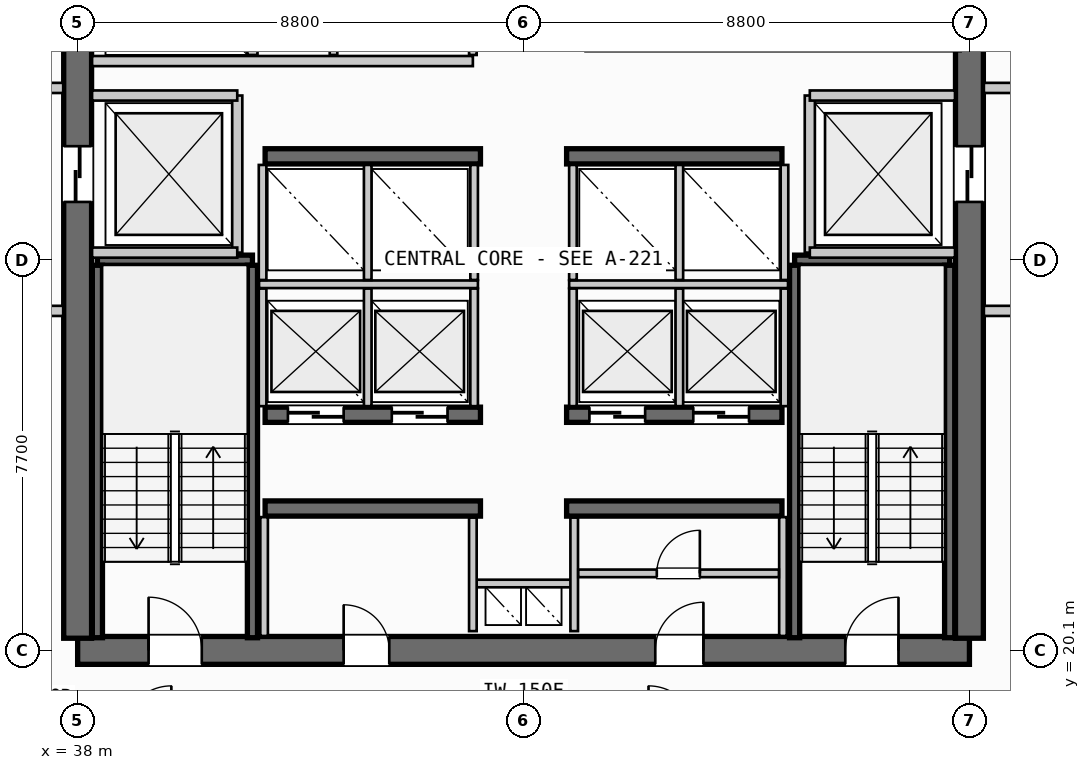
"""IFC4 building model, lengths in metres.
Left out: names, types, materials, properties, quantities, classifications, styles, units other than length and angle.
Written with IfcOpenShell. Run it as: python <this file> out.ifc"""

import sys

from ifc_helpers import new_model, si_unit, direction, frame, frame_2d, origin, place, context, subcontext, project, spatial, rectangle, extrude, source, transform, mapped, element, fill, save


model = new_model("IFC4")
c1 = context("Model", 3, precision=1e-05, world=origin(), true_north=direction((0.0, 1.0)))
c2 = subcontext(c1, "Body", "Model", "MODEL_VIEW")
j1 = project(units=[si_unit("LENGTHUNIT", "METRE"), si_unit("PLANEANGLEUNIT", "RADIAN")], contexts=[c1])
p1 = place(None, origin())
s1 = spatial("IfcSite", under=j1, at=p1, CompositionType="ELEMENT")
p2 = place(p1, origin())
s2 = spatial("IfcBuilding", under=s1, at=p2, CompositionType="ELEMENT")
p3 = place(p2, frame((0.0, 0.0, 153.65)))
s3 = spatial("IfcBuildingStorey", under=s2, at=p3, CompositionType="ELEMENT", Elevation=153.65)
p4 = place(p3, frame((38.0, 20.1, 0.0), z_axis=(0.0, 0.0, 1.0), x_axis=(1.0, 0.0, 0.0)))
e1 = element("IfcWall", 1, at=p4, inside=s3, PredefinedType="SHEAR", context=c2, shape_type="SweptSolid", body=[
    extrude(rectangle(XDim=17.6, YDim=0.55, at=frame_2d((8.8, 0.0))), origin(), (0.0, 0.0, 1.0), 3.3),
])
p5 = place(p4, frame((1.4, 0.0, 0.0)))
e2 = element("IfcOpeningElement", 2, at=p5, cuts=e1, PredefinedType="OPENING", context=c2, shape_type="SweptSolid", body=[
    extrude(rectangle(XDim=1.05, YDim=2.15, at=frame_2d((0.525, 1.075))), frame((0.0, 0.285, 0.0), z_axis=(0.0, -1.0, 0.0), x_axis=(1.0, 0.0, 0.0)), (0.0, 0.0, 1.0), 0.57),
])
p6 = place(p4, frame((15.15, 0.0, 0.0)))
e3 = element("IfcOpeningElement", 3, at=p6, cuts=e1, PredefinedType="OPENING", context=c2, shape_type="SweptSolid", body=[
    extrude(rectangle(XDim=1.05, YDim=2.15, at=frame_2d((0.525, 1.075))), frame((0.0, 0.285, 0.0), z_axis=(0.0, -1.0, 0.0), x_axis=(1.0, 0.0, 0.0)), (0.0, 0.0, 1.0), 0.57),
])
p7 = place(p4, frame((5.25, 0.0, 0.0)))
e4 = element("IfcOpeningElement", 4, at=p7, cuts=e1, PredefinedType="OPENING", context=c2, shape_type="SweptSolid", body=[
    extrude(rectangle(XDim=0.9, YDim=2.15, at=frame_2d((0.45, 1.075))), frame((0.0, 0.285, 0.0), z_axis=(0.0, -1.0, 0.0), x_axis=(1.0, 0.0, 0.0)), (0.0, 0.0, 1.0), 0.57),
])
p8 = place(p4, frame((11.4, 0.0, 0.0)))
e5 = element("IfcOpeningElement", 5, at=p8, cuts=e1, PredefinedType="OPENING", context=c2, shape_type="SweptSolid", body=[
    extrude(rectangle(XDim=0.95, YDim=2.15, at=frame_2d((0.475, 1.075))), frame((0.0, 0.285, 0.0), z_axis=(0.0, -1.0, 0.0), x_axis=(1.0, 0.0, 0.0)), (0.0, 0.0, 1.0), 0.57),
])
p9 = place(p3, frame((38.0, 35.26, 0.0), z_axis=(0.0, 0.0, 1.0), x_axis=(0.0, -1.0, 0.0)))
e6 = element("IfcWall", 6, at=p9, inside=s3, PredefinedType="SHEAR", context=c2, shape_type="SweptSolid", body=[
    extrude(rectangle(XDim=14.92, YDim=0.55, at=frame_2d((7.46, 0.0))), origin(), (0.0, 0.0, 1.0), 3.3),
])
p10 = place(p9, frame((5.21, 0.0, 0.0)))
e7 = element("IfcOpeningElement", 7, at=p10, cuts=e6, PredefinedType="OPENING", context=c2, shape_type="SweptSolid", body=[
    extrude(rectangle(XDim=1.1, YDim=2.2, at=frame_2d((0.55, 1.1))), frame((0.0, 0.285, 0.0), z_axis=(0.0, -1.0, 0.0), x_axis=(1.0, 0.0, 0.0)), (0.0, 0.0, 1.0), 0.57),
])
p11 = place(p3, frame((55.6, 20.34, 0.0), z_axis=(0.0, 0.0, 1.0), x_axis=(0.0, 1.0, 0.0)))
e8 = element("IfcWall", 8, at=p11, inside=s3, PredefinedType="SHEAR", context=c2, shape_type="SweptSolid", body=[
    extrude(rectangle(XDim=14.92, YDim=0.55, at=frame_2d((7.46, 0.0))), origin(), (0.0, 0.0, 1.0), 3.3),
])
p12 = place(p11, frame((12.71, 0.0, 0.0)))
e9 = element("IfcOpeningElement", 9, at=p12, cuts=e8, PredefinedType="OPENING", context=c2, shape_type="SweptSolid", body=[
    extrude(rectangle(XDim=1.05, YDim=2.15, at=frame_2d((0.525, 1.075))), frame((0.0, 0.285, 0.0), z_axis=(0.0, -1.0, 0.0), x_axis=(1.0, 0.0, 0.0)), (0.0, 0.0, 1.0), 0.57),
])
p13 = place(p11, frame((8.61, 0.0, 0.0)))
e10 = element("IfcOpeningElement", 10, at=p13, cuts=e8, PredefinedType="OPENING", context=c2, shape_type="SweptSolid", body=[
    extrude(rectangle(XDim=1.1, YDim=2.2, at=frame_2d((0.55, 1.1))), frame((0.0, 0.285, 0.0), z_axis=(0.0, -1.0, 0.0), x_axis=(1.0, 0.0, 0.0)), (0.0, 0.0, 1.0), 0.57),
])
for number, where, z_axis, x_axis in (
    (11, (41.7, 22.9, 0.0), (0.0, 0.0, 1.0), (1.0, 0.0, 0.0)),
    (12, (47.65, 22.9, 0.0), (0.0, 0.0, 1.0), (1.0, 0.0, 0.0)),
):
    element("IfcWall", number, at=place(p3, frame(where, z_axis=z_axis, x_axis=x_axis)), inside=s3, PredefinedType="SHEAR", context=c2, shape_type="SweptSolid", body=[
        extrude(rectangle(XDim=4.25, YDim=0.3, at=frame_2d((2.125, 0.0))), origin(), (0.0, 0.0, 1.0), 3.3),
    ])
p14 = place(p3, frame((41.7, 24.75, 0.0), z_axis=(0.0, 0.0, 1.0), x_axis=(1.0, 0.0, 0.0)))
e13 = element("IfcWall", 13, at=p14, inside=s3, PredefinedType="SHEAR", context=c2, shape_type="SweptSolid", body=[
    extrude(rectangle(XDim=4.25, YDim=0.3, at=frame_2d((2.125, 0.0))), origin(), (0.0, 0.0, 1.0), 3.3),
])
p15 = place(p14, frame((0.45, 0.0, 0.0)))
e14 = element("IfcOpeningElement", 14, at=p15, cuts=e13, PredefinedType="OPENING", context=c2, shape_type="SweptSolid", body=[
    extrude(rectangle(XDim=1.1, YDim=2.2, at=frame_2d((0.55, 1.1))), frame((0.0, 0.16, 0.0), z_axis=(0.0, -1.0, 0.0), x_axis=(1.0, 0.0, 0.0)), (0.0, 0.0, 1.0), 0.32),
])
p16 = place(p14, frame((2.5, 0.0, 0.0)))
e15 = element("IfcOpeningElement", 15, at=p16, cuts=e13, PredefinedType="OPENING", context=c2, shape_type="SweptSolid", body=[
    extrude(rectangle(XDim=1.1, YDim=2.2, at=frame_2d((0.55, 1.1))), frame((0.0, 0.16, 0.0), z_axis=(0.0, -1.0, 0.0), x_axis=(1.0, 0.0, 0.0)), (0.0, 0.0, 1.0), 0.32),
])
p17 = place(p3, frame((47.65, 24.75, 0.0), z_axis=(0.0, 0.0, 1.0), x_axis=(1.0, 0.0, 0.0)))
e16 = element("IfcWall", 16, at=p17, inside=s3, PredefinedType="SHEAR", context=c2, shape_type="SweptSolid", body=[
    extrude(rectangle(XDim=4.25, YDim=0.3, at=frame_2d((2.125, 0.0))), origin(), (0.0, 0.0, 1.0), 3.3),
])
p18 = place(p17, frame((0.45, 0.0, 0.0)))
e17 = element("IfcOpeningElement", 17, at=p18, cuts=e16, PredefinedType="OPENING", context=c2, shape_type="SweptSolid", body=[
    extrude(rectangle(XDim=1.1, YDim=2.2, at=frame_2d((0.55, 1.1))), frame((0.0, 0.16, 0.0), z_axis=(0.0, -1.0, 0.0), x_axis=(1.0, 0.0, 0.0)), (0.0, 0.0, 1.0), 0.32),
])
p19 = place(p17, frame((2.5, 0.0, 0.0)))
e18 = element("IfcOpeningElement", 18, at=p19, cuts=e16, PredefinedType="OPENING", context=c2, shape_type="SweptSolid", body=[
    extrude(rectangle(XDim=1.1, YDim=2.2, at=frame_2d((0.55, 1.1))), frame((0.0, 0.16, 0.0), z_axis=(0.0, -1.0, 0.0), x_axis=(1.0, 0.0, 0.0)), (0.0, 0.0, 1.0), 0.32),
])
for number, where, z_axis, x_axis in (
    (19, (41.7, 29.85, 0.0), (0.0, 0.0, 1.0), (1.0, 0.0, 0.0)),
    (20, (47.65, 29.85, 0.0), (0.0, 0.0, 1.0), (1.0, 0.0, 0.0)),
):
    element("IfcWall", number, at=place(p3, frame(where, z_axis=z_axis, x_axis=x_axis)), inside=s3, PredefinedType="SHEAR", context=c2, shape_type="SweptSolid", body=[
        extrude(rectangle(XDim=4.25, YDim=0.3, at=frame_2d((2.125, 0.0))), origin(), (0.0, 0.0, 1.0), 3.3),
    ])
p20 = place(p3, frame((38.39, 27.8, 0.0), z_axis=(0.0, 0.0, 1.0), x_axis=(1.0, 0.0, 0.0)))
e21 = element("IfcWall", 21, at=p20, inside=s3, PredefinedType="SHEAR", context=c2, shape_type="SweptSolid", body=[
    extrude(rectangle(XDim=3.06, YDim=0.2, at=frame_2d((1.53, 0.0))), origin(), (0.0, 0.0, 1.0), 3.3),
])
for number, where, z_axis, x_axis in (
    (22, (41.45, 27.7, 0.0), (0.0, 0.0, 1.0), (0.0, -1.0, 0.0)),
    (23, (38.39, 20.35, 0.0), (0.0, 0.0, 1.0), (0.0, 1.0, 0.0)),
):
    element("IfcWall", number, at=place(p3, frame(where, z_axis=z_axis, x_axis=x_axis)), inside=s3, PredefinedType="SHEAR", context=c2, shape_type="SweptSolid", body=[
        extrude(rectangle(XDim=7.35, YDim=0.2, at=frame_2d((3.675, 0.0))), origin(), (0.0, 0.0, 1.0), 3.3),
    ])
p21 = place(p3, frame((52.15, 27.8, 0.0), z_axis=(0.0, 0.0, 1.0), x_axis=(1.0, 0.0, 0.0)))
e24 = element("IfcWall", 24, at=p21, inside=s3, PredefinedType="SHEAR", context=c2, shape_type="SweptSolid", body=[
    extrude(rectangle(XDim=3.06, YDim=0.2, at=frame_2d((1.53, 0.0))), origin(), (0.0, 0.0, 1.0), 3.3),
])
for number, where, z_axis, x_axis in (
    (25, (55.21, 27.7, 0.0), (0.0, 0.0, 1.0), (0.0, -1.0, 0.0)),
    (26, (52.15, 20.35, 0.0), (0.0, 0.0, 1.0), (0.0, 1.0, 0.0)),
):
    element("IfcWall", number, at=place(p3, frame(where, z_axis=z_axis, x_axis=x_axis)), inside=s3, PredefinedType="SHEAR", context=c2, shape_type="SweptSolid", body=[
        extrude(rectangle(XDim=7.35, YDim=0.2, at=frame_2d((3.675, 0.0))), origin(), (0.0, 0.0, 1.0), 3.3),
    ])
p22 = place(p3, frame((45.8, 21.42, 0.0), z_axis=(0.0, 0.0, 1.0), x_axis=(1.0, 0.0, 0.0)))
e27 = element("IfcWall", 27, at=p22, inside=s3, PredefinedType="PARTITIONING", context=c2, shape_type="SweptSolid", body=[
    extrude(rectangle(XDim=2.0, YDim=0.15, at=frame_2d((1.0, 0.0))), origin(), (0.0, 0.0, 1.0), 2.28),
])
for number, where, z_axis, x_axis in (
    (28, (45.8, 20.48, 0.0), (0.0, 0.0, 1.0), (0.0, 1.0, 0.0)),
    (29, (47.8, 20.48, 0.0), (0.0, 0.0, 1.0), (0.0, 1.0, 0.0)),
):
    element("IfcWall", number, at=place(p3, frame(where, z_axis=z_axis, x_axis=x_axis)), inside=s3, PredefinedType="PARTITIONING", context=c2, shape_type="SweptSolid", body=[
        extrude(rectangle(XDim=2.24, YDim=0.15, at=frame_2d((1.12, 0.0))), origin(), (0.0, 0.0, 1.0), 2.28),
    ])
p23 = place(p3, frame((41.15, 27.95, 0.0), z_axis=(0.0, 0.0, 1.0), x_axis=(0.0, 1.0, 0.0)))
e30 = element("IfcWall", 30, at=p23, inside=s3, PredefinedType="PARTITIONING", context=c2, shape_type="SweptSolid", body=[
    extrude(rectangle(XDim=3.1, YDim=0.2, at=frame_2d((1.55, 0.0))), origin(), (0.0, 0.0, 1.0), 2.28),
])
for number, where, z_axis, x_axis in (
    (31, (38.285, 27.95, 0.0), (0.0, 0.0, 1.0), (1.0, 0.0, 0.0)),
    (32, (38.285, 31.05, 0.0), (0.0, 0.0, 1.0), (1.0, 0.0, 0.0)),
):
    element("IfcWall", number, at=place(p3, frame(where, z_axis=z_axis, x_axis=x_axis)), inside=s3, PredefinedType="PARTITIONING", context=c2, shape_type="SweptSolid", body=[
        extrude(rectangle(XDim=2.865, YDim=0.2, at=frame_2d((1.433, 0.0))), origin(), (0.0, 0.0, 1.0), 2.28),
    ])
for number, where, z_axis, x_axis in (
    (33, (34.5, 26.8, 0.0), (0.0, 0.0, 1.0), (1.0, 0.0, 0.0)),
    (34, (34.5, 31.2, 0.0), (0.0, 0.0, 1.0), (1.0, 0.0, 0.0)),
):
    element("IfcWall", number, at=place(p3, frame(where, z_axis=z_axis, x_axis=x_axis)), inside=s3, PredefinedType="PARTITIONING", context=c2, shape_type="SweptSolid", body=[
        extrude(rectangle(XDim=3.215, YDim=0.2, at=frame_2d((1.607, 0.0))), origin(), (0.0, 0.0, 1.0), 2.28),
    ])
p24 = place(p3, frame((52.45, 27.95, 0.0), z_axis=(0.0, 0.0, 1.0), x_axis=(0.0, 1.0, 0.0)))
e35 = element("IfcWall", 35, at=p24, inside=s3, PredefinedType="PARTITIONING", context=c2, shape_type="SweptSolid", body=[
    extrude(rectangle(XDim=3.1, YDim=0.2, at=frame_2d((1.55, 0.0))), origin(), (0.0, 0.0, 1.0), 2.28),
])
for number, where, z_axis, x_axis in (
    (36, (52.45, 27.95, 0.0), (0.0, 0.0, 1.0), (1.0, 0.0, 0.0)),
    (37, (52.45, 31.05, 0.0), (0.0, 0.0, 1.0), (1.0, 0.0, 0.0)),
):
    element("IfcWall", number, at=place(p3, frame(where, z_axis=z_axis, x_axis=x_axis)), inside=s3, PredefinedType="PARTITIONING", context=c2, shape_type="SweptSolid", body=[
        extrude(rectangle(XDim=2.865, YDim=0.2, at=frame_2d((1.433, 0.0))), origin(), (0.0, 0.0, 1.0), 2.28),
    ])
for number, where, z_axis, x_axis in (
    (38, (55.885, 26.8, 0.0), (0.0, 0.0, 1.0), (1.0, 0.0, 0.0)),
    (39, (55.885, 31.2, 0.0), (0.0, 0.0, 1.0), (1.0, 0.0, 0.0)),
):
    element("IfcWall", number, at=place(p3, frame(where, z_axis=z_axis, x_axis=x_axis)), inside=s3, PredefinedType="PARTITIONING", context=c2, shape_type="SweptSolid", body=[
        extrude(rectangle(XDim=3.215, YDim=0.2, at=frame_2d((1.607, 0.0))), origin(), (0.0, 0.0, 1.0), 2.28),
    ])
for number, where, z_axis, x_axis in (
    (40, (41.68, 20.385, 0.0), (0.0, 0.0, 1.0), (0.0, 1.0, 0.0)),
    (41, (51.92, 20.385, 0.0), (0.0, 0.0, 1.0), (0.0, 1.0, 0.0)),
):
    element("IfcWall", number, at=place(p3, frame(where, z_axis=z_axis, x_axis=x_axis)), inside=s3, PredefinedType="PARTITIONING", context=c2, shape_type="SweptSolid", body=[
        extrude(rectangle(XDim=2.345, YDim=0.15, at=frame_2d((1.172, 0.0))), origin(), (0.0, 0.0, 1.0), 2.28),
    ])
p25 = place(p3, frame((47.88, 21.62, 0.0), z_axis=(0.0, 0.0, 1.0), x_axis=(1.0, 0.0, 0.0)))
e42 = element("IfcWall", 42, at=p25, inside=s3, PredefinedType="PARTITIONING", context=c2, shape_type="SweptSolid", body=[
    extrude(rectangle(XDim=3.96, YDim=0.15, at=frame_2d((1.98, 0.0))), origin(), (0.0, 0.0, 1.0), 2.28),
])
p26 = place(p25, frame((1.55, 0.0, 0.0)))
e43 = element("IfcOpeningElement", 43, at=p26, cuts=e42, PredefinedType="OPENING", context=c2, shape_type="SweptSolid", body=[
    extrude(rectangle(XDim=0.85, YDim=2.15, at=frame_2d((0.425, 1.075))), frame((0.0, 0.085, 0.0), z_axis=(0.0, -1.0, 0.0), x_axis=(1.0, 0.0, 0.0)), (0.0, 0.0, 1.0), 0.17),
])
p27 = place(p3, frame((41.58, 27.325, 0.0), z_axis=(0.0, 0.0, 1.0), x_axis=(1.0, 0.0, 0.0)))
e44 = element("IfcWall", 44, at=p27, inside=s3, PredefinedType="PARTITIONING", context=c2, shape_type="SweptSolid", body=[
    extrude(rectangle(XDim=4.32, YDim=0.15, at=frame_2d((2.16, 0.0))), origin(), (0.0, 0.0, 1.0), 2.28),
])
p28 = place(p3, frame((47.7, 27.325, 0.0), z_axis=(0.0, 0.0, 1.0), x_axis=(1.0, 0.0, 0.0)))
e45 = element("IfcWall", 45, at=p28, inside=s3, PredefinedType="PARTITIONING", context=c2, shape_type="SweptSolid", body=[
    extrude(rectangle(XDim=4.32, YDim=0.15, at=frame_2d((2.16, 0.0))), origin(), (0.0, 0.0, 1.0), 2.28),
])
for number, where, z_axis, x_axis in (
    (46, (41.65, 24.92, 0.0), (0.0, 0.0, 1.0), (0.0, 1.0, 0.0)),
    (47, (43.725, 24.92, 0.0), (0.0, 0.0, 1.0), (0.0, 1.0, 0.0)),
    (48, (45.825, 24.92, 0.0), (0.0, 0.0, 1.0), (0.0, 1.0, 0.0)),
    (49, (47.775, 24.92, 0.0), (0.0, 0.0, 1.0), (0.0, 1.0, 0.0)),
    (50, (49.875, 24.92, 0.0), (0.0, 0.0, 1.0), (0.0, 1.0, 0.0)),
    (51, (51.95, 24.92, 0.0), (0.0, 0.0, 1.0), (0.0, 1.0, 0.0)),
):
    element("IfcWall", number, at=place(p3, frame(where, z_axis=z_axis, x_axis=x_axis)), inside=s3, PredefinedType="PARTITIONING", context=c2, shape_type="SweptSolid", body=[
        extrude(rectangle(XDim=2.32, YDim=0.15, at=frame_2d((1.16, 0.0))), origin(), (0.0, 0.0, 1.0), 2.28),
    ])
for number, where, z_axis, x_axis in (
    (52, (41.65, 27.41, 0.0), (0.0, 0.0, 1.0), (0.0, 1.0, 0.0)),
    (53, (43.725, 27.41, 0.0), (0.0, 0.0, 1.0), (0.0, 1.0, 0.0)),
    (54, (45.825, 27.41, 0.0), (0.0, 0.0, 1.0), (0.0, 1.0, 0.0)),
    (55, (47.775, 27.41, 0.0), (0.0, 0.0, 1.0), (0.0, 1.0, 0.0)),
    (56, (49.875, 27.41, 0.0), (0.0, 0.0, 1.0), (0.0, 1.0, 0.0)),
    (57, (51.95, 27.41, 0.0), (0.0, 0.0, 1.0), (0.0, 1.0, 0.0)),
):
    element("IfcWall", number, at=place(p3, frame(where, z_axis=z_axis, x_axis=x_axis)), inside=s3, PredefinedType="PARTITIONING", context=c2, shape_type="SweptSolid", body=[
        extrude(rectangle(XDim=2.27, YDim=0.15, at=frame_2d((1.135, 0.0))), origin(), (0.0, 0.0, 1.0), 2.28),
    ])
p29 = place(p3, frame((41.45, 31.85, 0.0), z_axis=(0.0, 0.0, 1.0), x_axis=(0.0, 1.0, 0.0)))
e58 = element("IfcWall", 58, at=p29, inside=s3, PredefinedType="PARTITIONING", context=c2, shape_type="SweptSolid", body=[
    extrude(rectangle(XDim=3.365, YDim=0.2, at=frame_2d((1.683, 0.0))), origin(), (0.0, 0.0, 1.0), 2.28),
])
p30 = place(p3, frame((38.285, 31.73, 0.0), z_axis=(0.0, 0.0, 1.0), x_axis=(1.0, 0.0, 0.0)))
e59 = element("IfcWall", 59, at=p30, inside=s3, PredefinedType="PARTITIONING", context=c2, shape_type="SweptSolid", body=[
    extrude(rectangle(XDim=7.515, YDim=0.2, at=frame_2d((3.758, 0.0))), origin(), (0.0, 0.0, 1.0), 2.28),
])
p31 = place(p3, frame((45.8, 31.85, 0.0), z_axis=(0.0, 0.0, 1.0), x_axis=(0.0, 1.0, 0.0)))
e60 = element("IfcWall", 60, at=p31, inside=s3, PredefinedType="PARTITIONING", context=c2, shape_type="SweptSolid", body=[
    extrude(rectangle(XDim=3.365, YDim=0.15, at=frame_2d((1.683, 0.0))), origin(), (0.0, 0.0, 1.0), 2.28),
])
p32 = place(p3, frame((43.05, 31.85, 0.0), z_axis=(0.0, 0.0, 1.0), x_axis=(0.0, 1.0, 0.0)))
e61 = element("IfcWall", 61, at=p32, inside=s3, PredefinedType="PLUMBINGWALL", context=c2, shape_type="SweptSolid", body=[
    extrude(rectangle(XDim=3.365, YDim=0.15, at=frame_2d((1.683, 0.0))), origin(), (0.0, 0.0, 1.0), 2.28),
])
m1 = source(origin(), c2, "Body", "SweptSolid", [
    extrude(rectangle(XDim=1.05, YDim=2.15, at=frame_2d((0.525, 1.075))), frame((0.0, 0.025, 0.0), z_axis=(0.0, -1.0, 0.0), x_axis=(1.0, 0.0, 0.0)), (0.0, 0.0, 1.0), 0.05),
])
p33 = place(p5, origin())
e62 = element("IfcDoor", 62, at=p33, inside=s3, OperationType="SINGLE_SWING_LEFT", PredefinedType="DOOR", context=c2, shape_type="MappedRepresentation", body=[
    mapped(m1, transform((0.0, 0.0, 0.0), scale=1.0)),
])
fill(e2, e62)
p34 = place(p6, origin())
e63 = element("IfcDoor", 63, at=p34, inside=s3, OperationType="SINGLE_SWING_RIGHT", PredefinedType="DOOR", context=c2, shape_type="MappedRepresentation", body=[
    mapped(m1, transform((0.0, 0.0, 0.0), scale=1.0)),
])
fill(e3, e63)
m2 = source(origin(), c2, "Body", "SweptSolid", [
    extrude(rectangle(XDim=1.1, YDim=2.2, at=frame_2d((0.55, 1.1))), frame((0.0, 0.025, 0.0), z_axis=(0.0, -1.0, 0.0), x_axis=(1.0, 0.0, 0.0)), (0.0, 0.0, 1.0), 0.05),
])
p35 = place(p10, origin())
e64 = element("IfcDoor", 64, at=p35, inside=s3, OperationType="SLIDING_TO_LEFT", PredefinedType="DOOR", context=c2, shape_type="MappedRepresentation", body=[
    mapped(m2, transform((0.0, 0.0, 0.0), scale=1.0)),
])
fill(e7, e64)
p36 = place(p13, origin())
e65 = element("IfcDoor", 65, at=p36, inside=s3, OperationType="SLIDING_TO_RIGHT", PredefinedType="DOOR", context=c2, shape_type="MappedRepresentation", body=[
    mapped(m2, transform((0.0, 0.0, 0.0), scale=1.0)),
])
fill(e10, e65)
m3 = source(origin(), c2, "Body", "SweptSolid", [
    extrude(rectangle(XDim=0.9, YDim=2.15, at=frame_2d((0.45, 1.075))), frame((0.0, 0.025, 0.0), z_axis=(0.0, -1.0, 0.0), x_axis=(1.0, 0.0, 0.0)), (0.0, 0.0, 1.0), 0.05),
])
p37 = place(p7, origin())
e66 = element("IfcDoor", 66, at=p37, inside=s3, OperationType="SINGLE_SWING_LEFT", PredefinedType="DOOR", context=c2, shape_type="MappedRepresentation", body=[
    mapped(m3, transform((0.0, 0.0, 0.0), scale=1.0)),
])
fill(e4, e66)
m4 = source(origin(), c2, "Body", "SweptSolid", [
    extrude(rectangle(XDim=0.95, YDim=2.15, at=frame_2d((0.475, 1.075))), frame((0.0, 0.025, 0.0), z_axis=(0.0, -1.0, 0.0), x_axis=(1.0, 0.0, 0.0)), (0.0, 0.0, 1.0), 0.05),
])
p38 = place(p8, origin())
e67 = element("IfcDoor", 67, at=p38, inside=s3, OperationType="SINGLE_SWING_RIGHT", PredefinedType="DOOR", context=c2, shape_type="MappedRepresentation", body=[
    mapped(m4, transform((0.0, 0.0, 0.0), scale=1.0)),
])
fill(e5, e67)
p39 = place(p15, origin())
e68 = element("IfcDoor", 68, at=p39, inside=s3, OperationType="SLIDING_TO_RIGHT", PredefinedType="DOOR", context=c2, shape_type="MappedRepresentation", body=[
    mapped(m2, transform((0.0, 0.0, 0.0), scale=1.0)),
])
fill(e14, e68)
p40 = place(p16, origin())
e69 = element("IfcDoor", 69, at=p40, inside=s3, OperationType="SLIDING_TO_RIGHT", PredefinedType="DOOR", context=c2, shape_type="MappedRepresentation", body=[
    mapped(m2, transform((0.0, 0.0, 0.0), scale=1.0)),
])
fill(e15, e69)
p41 = place(p18, origin())
e70 = element("IfcDoor", 70, at=p41, inside=s3, OperationType="SLIDING_TO_RIGHT", PredefinedType="DOOR", context=c2, shape_type="MappedRepresentation", body=[
    mapped(m2, transform((0.0, 0.0, 0.0), scale=1.0)),
])
fill(e17, e70)
p42 = place(p19, origin())
e71 = element("IfcDoor", 71, at=p42, inside=s3, OperationType="SLIDING_TO_RIGHT", PredefinedType="DOOR", context=c2, shape_type="MappedRepresentation", body=[
    mapped(m2, transform((0.0, 0.0, 0.0), scale=1.0)),
])
fill(e18, e71)
m5 = source(origin(), c2, "Body", "SweptSolid", [
    extrude(rectangle(XDim=0.85, YDim=2.15, at=frame_2d((0.425, 1.075))), frame((0.0, 0.025, 0.0), z_axis=(0.0, -1.0, 0.0), x_axis=(1.0, 0.0, 0.0)), (0.0, 0.0, 1.0), 0.05),
])
p43 = place(p26, origin())
e72 = element("IfcDoor", 72, at=p43, inside=s3, OperationType="SINGLE_SWING_RIGHT", PredefinedType="DOOR", context=c2, shape_type="MappedRepresentation", body=[
    mapped(m5, transform((0.0, 0.0, 0.0), scale=1.0)),
])
fill(e43, e72)
save(model, sys.argv[1])
